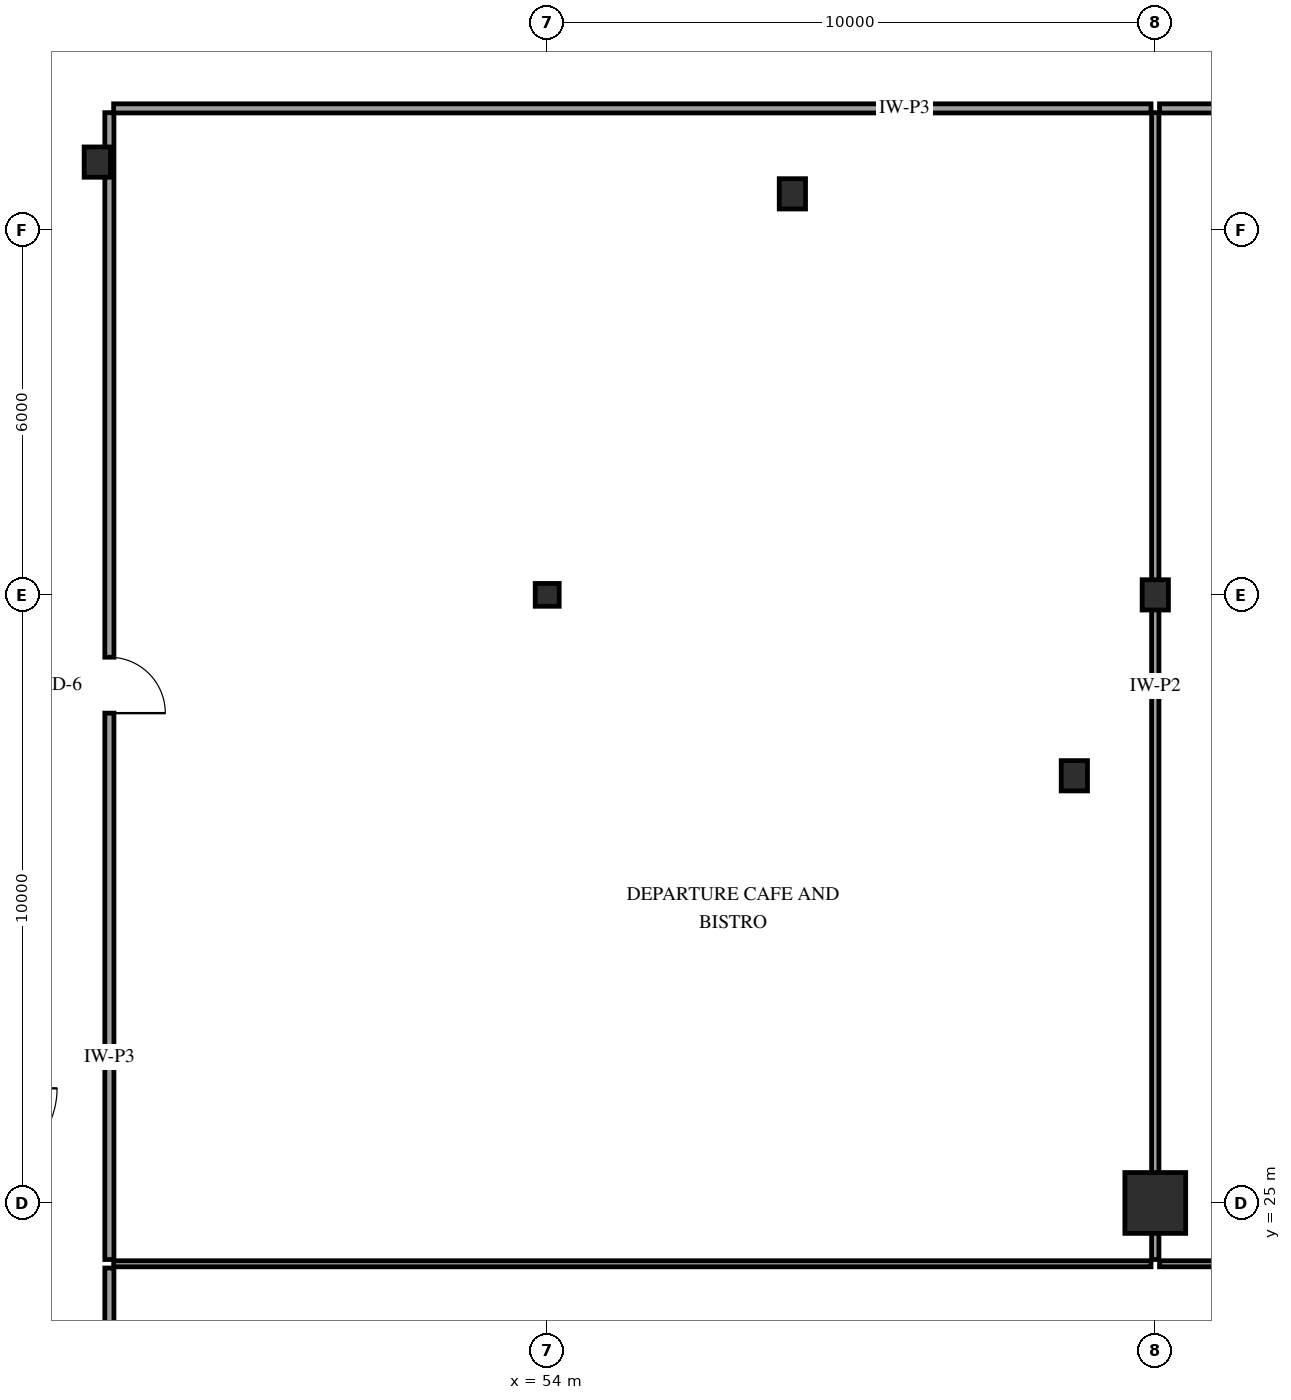
"""IFC4 building model, lengths in metres.
Left out: names, types, materials, properties, quantities, classifications, styles, units other than length and angle.
Written with IfcOpenShell. Run it as: python <this file> out.ifc"""

import sys

from ifc_helpers import new_model, si_unit, direction, frame, frame_2d, origin, origin_2d, place, context, subcontext, project, spatial, rectangle, i_section, extrude, element, fill, save


model = new_model("IFC4")
c1 = context("Model", 3, precision=1e-05, world=origin(), true_north=direction((0.0, 1.0)))
c2 = subcontext(c1, "Body", "Model", "MODEL_VIEW")
j1 = project(units=[si_unit("LENGTHUNIT", "METRE"), si_unit("PLANEANGLEUNIT", "RADIAN")], contexts=[c1])
p1 = place(None, origin())
s1 = spatial("IfcSite", under=j1, at=p1, CompositionType="ELEMENT")
p2 = place(p1, origin())
s2 = spatial("IfcBuilding", under=s1, at=p2, CompositionType="ELEMENT")
p3 = place(p2, frame((0.0, 0.0, 16.2)))
s3 = spatial("IfcBuildingStorey", under=s2, at=p3, CompositionType="ELEMENT", Elevation=16.2)
p4 = place(p3, frame((64.0, 35.0, 0.0), z_axis=(0.0, 0.0, 1.0), x_axis=(1.0, 0.0, 0.0)))
e1 = element("IfcColumn", 1, at=p4, inside=s3, PredefinedType="COLUMN", context=c2, shape_type="SweptSolid", body=[
    extrude(i_section(OverallWidth=0.432, OverallDepth=0.498, WebThickness=0.056, FlangeThickness=0.089, FilletRadius=0.038, at=origin_2d()), origin(), (0.0, 0.0, 1.0), 4.5),
])
p5 = place(p3, frame((64.0, 25.0, 0.0), z_axis=(0.0, 0.0, 1.0), x_axis=(1.0, 0.0, 0.0)))
e2 = element("IfcColumn", 2, at=p5, inside=s3, PredefinedType="COLUMN", context=c2, shape_type="SweptSolid", body=[
    extrude(rectangle(XDim=1.0, YDim=1.0, at=origin_2d()), origin(), (0.0, 0.0, 1.0), 4.5),
])
p6 = place(p3, frame((54.0, 35.0, 0.0), z_axis=(0.0, 0.0, 1.0), x_axis=(1.0, 0.0, 0.0)))
e3 = element("IfcColumn", 3, at=p6, inside=s3, PredefinedType="COLUMN", context=c2, shape_type="SweptSolid", body=[
    extrude(i_section(OverallWidth=0.394, OverallDepth=0.375, WebThickness=0.017, FlangeThickness=0.028, FilletRadius=0.038, at=origin_2d()), origin(), (0.0, 0.0, 1.0), 4.5),
])
for number, where, z_axis, x_axis in (
    (4, (62.669, 32.025, 0.0), (0.0, 0.0, 1.0), (1.0, 0.0, 0.0)),
    (5, (58.032, 41.595, 0.0), (0.0, 0.0, 1.0), (1.0, 0.0, 0.0)),
    (6, (46.601, 42.117, 0.0), (0.0, 0.0, 1.0), (1.0, 0.0, 0.0)),
):
    element("IfcColumn", number, at=place(p3, frame(where, z_axis=z_axis, x_axis=x_axis)), inside=s3, PredefinedType="COLUMN", context=c2, shape_type="SweptSolid", body=[
        extrude(i_section(OverallWidth=0.432, OverallDepth=0.498, WebThickness=0.056, FlangeThickness=0.089, FilletRadius=0.038, at=origin_2d()), origin(), (0.0, 0.0, 1.0), 4.5),
    ])
p7 = place(p3, frame((64.07, 24.0, 0.0), z_axis=(0.0, 0.0, 1.0), x_axis=(1.0, 0.0, 0.0)))
e7 = element("IfcWall", 7, at=p7, inside=s3, PredefinedType="PARTITIONING", context=c2, shape_type="SweptSolid", body=[
    extrude(rectangle(XDim=19.93, YDim=0.1, at=frame_2d((9.965, 0.0))), origin(), (0.0, 0.0, 1.0), 4.18),
])
p8 = place(p3, frame((46.8, 42.93, 0.0), z_axis=(0.0, 0.0, 1.0), x_axis=(0.0, -1.0, 0.0)))
e8 = element("IfcWall", 8, at=p8, inside=s3, PredefinedType="PARTITIONING", context=c2, shape_type="SweptSolid", body=[
    extrude(rectangle(XDim=18.86, YDim=0.15, at=frame_2d((9.43, 0.0))), origin(), (0.0, 0.0, 1.0), 4.18),
])
p9 = place(p8, frame((8.955, 0.0, 0.0)))
e9 = element("IfcOpeningElement", 9, at=p9, cuts=e8, PredefinedType="OPENING", context=c2, shape_type="SweptSolid", body=[
    extrude(rectangle(XDim=0.92, YDim=2.12, at=frame_2d((0.46, 1.06))), frame((0.0, 0.085, 0.0), z_axis=(0.0, -1.0, 0.0), x_axis=(1.0, 0.0, 0.0)), (0.0, 0.0, 1.0), 0.17),
])
p10 = place(p3, frame((64.0, 42.93, 0.0), z_axis=(0.0, 0.0, 1.0), x_axis=(0.0, -1.0, 0.0)))
e10 = element("IfcWall", 10, at=p10, inside=s3, PredefinedType="PARTITIONING", context=c2, shape_type="SweptSolid", body=[
    extrude(rectangle(XDim=18.86, YDim=0.12, at=frame_2d((9.43, 0.0))), origin(), (0.0, 0.0, 1.0), 3.302),
])
p11 = place(p3, frame((63.93, 43.0, 0.0), z_axis=(0.0, 0.0, 1.0), x_axis=(-1.0, 0.0, 0.0)))
e11 = element("IfcWall", 11, at=p11, inside=s3, PredefinedType="PARTITIONING", context=c2, shape_type="SweptSolid", body=[
    extrude(rectangle(XDim=17.06, YDim=0.15, at=frame_2d((8.53, 0.0))), origin(), (0.0, 0.0, 1.0), 4.18),
])
p12 = place(p3, frame((46.87, 24.0, 0.0), z_axis=(0.0, 0.0, 1.0), x_axis=(1.0, 0.0, 0.0)))
e12 = element("IfcWall", 12, at=p12, inside=s3, PredefinedType="PARTITIONING", context=c2, shape_type="SweptSolid", body=[
    extrude(rectangle(XDim=17.06, YDim=0.1, at=frame_2d((8.53, 0.0))), origin(), (0.0, 0.0, 1.0), 4.18),
])
p13 = place(p3, frame((46.8, 23.93, 0.0), z_axis=(0.0, 0.0, 1.0), x_axis=(0.0, -1.0, 0.0)))
e13 = element("IfcWall", 13, at=p13, inside=s3, PredefinedType="PARTITIONING", context=c2, shape_type="SweptSolid", body=[
    extrude(rectangle(XDim=12.06, YDim=0.15, at=frame_2d((6.03, 0.0))), origin(), (0.0, 0.0, 1.0), 4.18),
])
p14 = place(p3, frame((72.88, 43.0, 0.0), z_axis=(0.0, 0.0, 1.0), x_axis=(-1.0, 0.0, 0.0)))
e14 = element("IfcWall", 14, at=p14, inside=s3, PredefinedType="PARTITIONING", context=c2, shape_type="SweptSolid", body=[
    extrude(rectangle(XDim=8.81, YDim=0.15, at=frame_2d((4.405, 0.0))), origin(), (0.0, 0.0, 1.0), 4.18),
])
p15 = place(p9, origin())
e15 = element("IfcDoor", 15, at=p15, inside=s3, OperationType="SINGLE_SWING_RIGHT", PredefinedType="DOOR", context=c2, shape_type="SweptSolid", body=[
    extrude(rectangle(XDim=0.92, YDim=2.12, at=frame_2d((0.46, 1.06))), frame((0.0, 0.025, 0.0), z_axis=(0.0, -1.0, 0.0), x_axis=(1.0, 0.0, 0.0)), (0.0, 0.0, 1.0), 0.05),
])
fill(e9, e15)
save(model, sys.argv[1])
